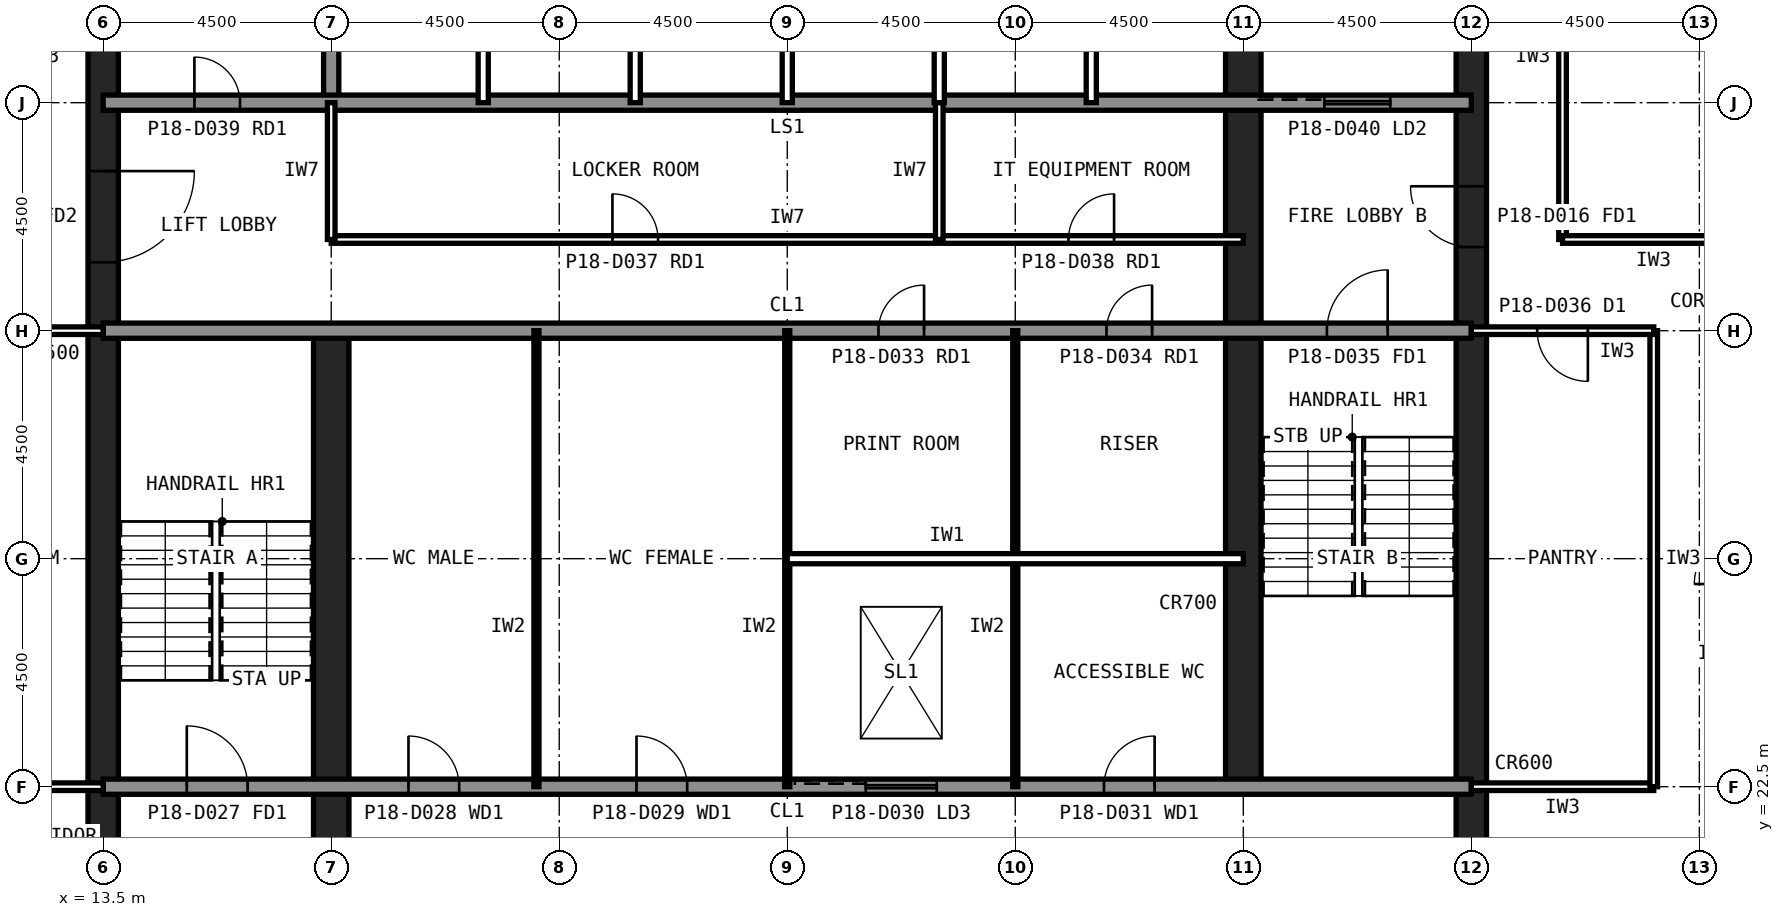
"""IFC4 building model, lengths in metres.
Left out: names, types, materials, properties, quantities, classifications, styles, units other than length and angle.
Written with IfcOpenShell. Run it as: python <this file> out.ifc"""

import sys

from ifc_helpers import new_model, si_unit, direction, frame, frame_2d, origin, place, context, subcontext, project, spatial, rectangle, extrude, element, fill, save


model = new_model("IFC4")
c1 = context("Model", 3, precision=1e-05, world=origin(), true_north=direction((0.0, 1.0)))
c2 = subcontext(c1, "Body", "Model", "MODEL_VIEW")
j1 = project(units=[si_unit("LENGTHUNIT", "METRE"), si_unit("PLANEANGLEUNIT", "RADIAN")], contexts=[c1])
p1 = place(None, origin())
s1 = spatial("IfcSite", under=j1, at=p1, CompositionType="ELEMENT")
p2 = place(p1, origin())
s2 = spatial("IfcBuilding", under=s1, at=p2, CompositionType="ELEMENT")
p3 = place(p2, frame((0.0, 0.0, 79.4)))
s3 = spatial("IfcBuildingStorey", under=s2, at=p3, CompositionType="ELEMENT", Elevation=79.4)
p4 = place(p3, frame((40.5, 13.5, 0.0), z_axis=(0.0, 0.0, 1.0), x_axis=(0.0, 1.0, 0.0)))
e1 = element("IfcWall", 1, at=p4, inside=s3, PredefinedType="SHEAR", context=c2, shape_type="SweptSolid", body=[
    extrude(rectangle(XDim=27.0, YDim=0.6, at=frame_2d((13.5, 0.0))), origin(), (0.0, 0.0, 1.0), 4.2),
])
p5 = place(p4, frame((5.85, 0.0, 0.0)))
e2 = element("IfcOpeningElement", 2, at=p5, cuts=e1, PredefinedType="OPENING", context=c2, shape_type="SweptSolid", body=[
    extrude(rectangle(XDim=1.8, YDim=2.1, at=frame_2d((0.9, 1.05))), frame((0.0, 0.31, 0.0), z_axis=(0.0, -1.0, 0.0), x_axis=(1.0, 0.0, 0.0)), (0.0, 0.0, 1.0), 0.62),
])
p6 = place(p4, frame((19.65, 0.0, 0.0)))
e3 = element("IfcOpeningElement", 3, at=p6, cuts=e1, PredefinedType="OPENING", context=c2, shape_type="SweptSolid", body=[
    extrude(rectangle(XDim=1.2, YDim=2.1, at=frame_2d((0.6, 1.05))), frame((0.0, 0.31, 0.0), z_axis=(0.0, -1.0, 0.0), x_axis=(1.0, 0.0, 0.0)), (0.0, 0.0, 1.0), 0.62),
])
p7 = place(p3, frame((13.5, 40.5, 0.0), z_axis=(0.0, 0.0, 1.0), x_axis=(0.0, -1.0, 0.0)))
e4 = element("IfcWall", 4, at=p7, inside=s3, PredefinedType="SHEAR", context=c2, shape_type="SweptSolid", body=[
    extrude(rectangle(XDim=27.0, YDim=0.6, at=frame_2d((13.5, 0.0))), origin(), (0.0, 0.0, 1.0), 4.2),
])
p8 = place(p7, frame((19.65, 0.0, 0.0)))
e5 = element("IfcOpeningElement", 5, at=p8, cuts=e4, PredefinedType="OPENING", context=c2, shape_type="SweptSolid", body=[
    extrude(rectangle(XDim=1.2, YDim=2.1, at=frame_2d((0.6, 1.05))), frame((0.0, 0.31, 0.0), z_axis=(0.0, -1.0, 0.0), x_axis=(1.0, 0.0, 0.0)), (0.0, 0.0, 1.0), 0.62),
])
p9 = place(p7, frame((5.85, 0.0, 0.0)))
e6 = element("IfcOpeningElement", 6, at=p9, cuts=e4, PredefinedType="OPENING", context=c2, shape_type="SweptSolid", body=[
    extrude(rectangle(XDim=1.8, YDim=2.1, at=frame_2d((0.9, 1.05))), frame((0.0, 0.31, 0.0), z_axis=(0.0, -1.0, 0.0), x_axis=(1.0, 0.0, 0.0)), (0.0, 0.0, 1.0), 0.62),
])
p10 = place(p3, frame((18.0, 13.5, 0.0), z_axis=(0.0, 0.0, 1.0), x_axis=(0.0, 1.0, 0.0)))
e7 = element("IfcWall", 7, at=p10, inside=s3, PredefinedType="SHEAR", context=c2, shape_type="SweptSolid", body=[
    extrude(rectangle(XDim=18.0, YDim=0.7, at=frame_2d((9.0, 0.0))), origin(), (0.0, 0.0, 1.0), 4.2),
])
p11 = place(p3, frame((18.0, 36.0, 0.0), z_axis=(0.0, 0.0, 1.0), x_axis=(0.0, 1.0, 0.0)))
e8 = element("IfcWall", 8, at=p11, inside=s3, PredefinedType="SOLIDWALL", context=c2, shape_type="SweptSolid", body=[
    extrude(rectangle(XDim=4.5, YDim=0.3, at=frame_2d((2.25, 0.0))), origin(), (0.0, 0.0, 1.0), 4.04),
])
p12 = place(p3, frame((36.0, 22.5, 0.0), z_axis=(0.0, 0.0, 1.0), x_axis=(0.0, 1.0, 0.0)))
e9 = element("IfcWall", 9, at=p12, inside=s3, PredefinedType="SHEAR", context=c2, shape_type="SweptSolid", body=[
    extrude(rectangle(XDim=18.0, YDim=0.7, at=frame_2d((9.0, 0.0))), origin(), (0.0, 0.0, 1.0), 4.2),
])
p13 = place(p3, frame((13.5, 36.0, 0.0), z_axis=(0.0, 0.0, 1.0), x_axis=(1.0, 0.0, 0.0)))
e10 = element("IfcWall", 10, at=p13, inside=s3, PredefinedType="SOLIDWALL", context=c2, shape_type="SweptSolid", body=[
    extrude(rectangle(XDim=27.0, YDim=0.3, at=frame_2d((13.5, 0.0))), origin(), (0.0, 0.0, 1.0), 4.04),
])
p14 = place(p13, frame((1.8, 0.0, 0.0)))
e11 = element("IfcOpeningElement", 11, at=p14, cuts=e10, PredefinedType="OPENING", context=c2, shape_type="SweptSolid", body=[
    extrude(rectangle(XDim=0.9, YDim=2.1, at=frame_2d((0.45, 1.05))), frame((0.0, 0.16, 0.0), z_axis=(0.0, -1.0, 0.0), x_axis=(1.0, 0.0, 0.0)), (0.0, 0.0, 1.0), 0.32),
])
p15 = place(p13, frame((24.1, 0.0, 0.0)))
e12 = element("IfcOpeningElement", 12, at=p15, cuts=e10, PredefinedType="OPENING", context=c2, shape_type="SweptSolid", body=[
    extrude(rectangle(XDim=1.3, YDim=2.2, at=frame_2d((0.65, 1.1))), frame((0.0, 0.16, 0.0), z_axis=(0.0, -1.0, 0.0), x_axis=(1.0, 0.0, 0.0)), (0.0, 0.0, 1.0), 0.32),
])
p16 = place(p3, frame((13.5, 22.5, 0.0), z_axis=(0.0, 0.0, 1.0), x_axis=(1.0, 0.0, 0.0)))
e13 = element("IfcWall", 13, at=p16, inside=s3, PredefinedType="SOLIDWALL", context=c2, shape_type="SweptSolid", body=[
    extrude(rectangle(XDim=27.0, YDim=0.3, at=frame_2d((13.5, 0.0))), origin(), (0.0, 0.0, 1.0), 4.04),
])
p17 = place(p16, frame((1.65, 0.0, 0.0)))
e14 = element("IfcOpeningElement", 14, at=p17, cuts=e13, PredefinedType="OPENING", context=c2, shape_type="SweptSolid", body=[
    extrude(rectangle(XDim=1.2, YDim=2.1, at=frame_2d((0.6, 1.05))), frame((0.0, 0.16, 0.0), z_axis=(0.0, -1.0, 0.0), x_axis=(1.0, 0.0, 0.0)), (0.0, 0.0, 1.0), 0.32),
])
p18 = place(p16, frame((6.025, 0.0, 0.0)))
e15 = element("IfcOpeningElement", 15, at=p18, cuts=e13, PredefinedType="OPENING", context=c2, shape_type="SweptSolid", body=[
    extrude(rectangle(XDim=1.0, YDim=2.1, at=frame_2d((0.5, 1.05))), frame((0.0, 0.16, 0.0), z_axis=(0.0, -1.0, 0.0), x_axis=(1.0, 0.0, 0.0)), (0.0, 0.0, 1.0), 0.32),
])
p19 = place(p16, frame((10.525, 0.0, 0.0)))
e16 = element("IfcOpeningElement", 16, at=p19, cuts=e13, PredefinedType="OPENING", context=c2, shape_type="SweptSolid", body=[
    extrude(rectangle(XDim=1.0, YDim=2.1, at=frame_2d((0.5, 1.05))), frame((0.0, 0.16, 0.0), z_axis=(0.0, -1.0, 0.0), x_axis=(1.0, 0.0, 0.0)), (0.0, 0.0, 1.0), 0.32),
])
p20 = place(p16, frame((19.75, 0.0, 0.0)))
e17 = element("IfcOpeningElement", 17, at=p20, cuts=e13, PredefinedType="OPENING", context=c2, shape_type="SweptSolid", body=[
    extrude(rectangle(XDim=1.0, YDim=2.1, at=frame_2d((0.5, 1.05))), frame((0.0, 0.16, 0.0), z_axis=(0.0, -1.0, 0.0), x_axis=(1.0, 0.0, 0.0)), (0.0, 0.0, 1.0), 0.32),
])
p21 = place(p16, frame((15.05, 0.0, 0.0)))
e18 = element("IfcOpeningElement", 18, at=p21, cuts=e13, PredefinedType="OPENING", context=c2, shape_type="SweptSolid", body=[
    extrude(rectangle(XDim=1.4, YDim=2.4, at=frame_2d((0.7, 1.2))), frame((0.0, 0.16, 0.0), z_axis=(0.0, -1.0, 0.0), x_axis=(1.0, 0.0, 0.0)), (0.0, 0.0, 1.0), 0.32),
])
p22 = place(p3, frame((13.5, 31.5, 0.0), z_axis=(0.0, 0.0, 1.0), x_axis=(1.0, 0.0, 0.0)))
e19 = element("IfcWall", 19, at=p22, inside=s3, PredefinedType="SOLIDWALL", context=c2, shape_type="SweptSolid", body=[
    extrude(rectangle(XDim=27.0, YDim=0.3, at=frame_2d((13.5, 0.0))), origin(), (0.0, 0.0, 1.0), 4.04),
])
p23 = place(p22, frame((24.15, 0.0, 0.0)))
e20 = element("IfcOpeningElement", 20, at=p23, cuts=e19, PredefinedType="OPENING", context=c2, shape_type="SweptSolid", body=[
    extrude(rectangle(XDim=1.2, YDim=2.1, at=frame_2d((0.6, 1.05))), frame((0.0, 0.16, 0.0), z_axis=(0.0, -1.0, 0.0), x_axis=(1.0, 0.0, 0.0)), (0.0, 0.0, 1.0), 0.32),
])
p24 = place(p22, frame((15.3, 0.0, 0.0)))
e21 = element("IfcOpeningElement", 21, at=p24, cuts=e19, PredefinedType="OPENING", context=c2, shape_type="SweptSolid", body=[
    extrude(rectangle(XDim=0.9, YDim=2.1, at=frame_2d((0.45, 1.05))), frame((0.0, 0.16, 0.0), z_axis=(0.0, -1.0, 0.0), x_axis=(1.0, 0.0, 0.0)), (0.0, 0.0, 1.0), 0.32),
])
p25 = place(p22, frame((19.8, 0.0, 0.0)))
e22 = element("IfcOpeningElement", 22, at=p25, cuts=e19, PredefinedType="OPENING", context=c2, shape_type="SweptSolid", body=[
    extrude(rectangle(XDim=0.9, YDim=2.1, at=frame_2d((0.45, 1.05))), frame((0.0, 0.16, 0.0), z_axis=(0.0, -1.0, 0.0), x_axis=(1.0, 0.0, 0.0)), (0.0, 0.0, 1.0), 0.32),
])
for number, where, z_axis, x_axis in (
    (23, (21.0, 36.0, 0.0), (0.0, 0.0, 1.0), (0.0, 1.0, 0.0)),
    (24, (24.0, 36.0, 0.0), (0.0, 0.0, 1.0), (0.0, 1.0, 0.0)),
    (25, (27.0, 36.0, 0.0), (0.0, 0.0, 1.0), (0.0, 1.0, 0.0)),
    (26, (30.0, 36.0, 0.0), (0.0, 0.0, 1.0), (0.0, 1.0, 0.0)),
    (27, (33.0, 36.0, 0.0), (0.0, 0.0, 1.0), (0.0, 1.0, 0.0)),
):
    element("IfcWall", number, at=place(p3, frame(where, z_axis=z_axis, x_axis=x_axis)), inside=s3, PredefinedType="PARTITIONING", context=c2, shape_type="SweptSolid", body=[
        extrude(rectangle(XDim=4.5, YDim=0.2, at=frame_2d((2.25, 0.0))), origin(), (0.0, 0.0, 1.0), 4.04),
    ])
for number, where, z_axis, x_axis in (
    (28, (22.05, 22.5, 0.0), (0.0, 0.0, 1.0), (0.0, 1.0, 0.0)),
    (29, (27.0, 22.5, 0.0), (0.0, 0.0, 1.0), (0.0, 1.0, 0.0)),
    (30, (31.5, 22.5, 0.0), (0.0, 0.0, 1.0), (0.0, 1.0, 0.0)),
):
    element("IfcWall", number, at=place(p3, frame(where, z_axis=z_axis, x_axis=x_axis)), inside=s3, PredefinedType="PLUMBINGWALL", context=c2, shape_type="SweptSolid", body=[
        extrude(rectangle(XDim=9.0, YDim=0.1, at=frame_2d((4.5, 0.0))), origin(), (0.0, 0.0, 1.0), 4.04),
    ])
p26 = place(p3, frame((27.0, 27.0, 0.0), z_axis=(0.0, 0.0, 1.0), x_axis=(1.0, 0.0, 0.0)))
e31 = element("IfcWall", 31, at=p26, inside=s3, PredefinedType="PARTITIONING", context=c2, shape_type="SweptSolid", body=[
    extrude(rectangle(XDim=9.0, YDim=0.2, at=frame_2d((4.5, 0.0))), origin(), (0.0, 0.0, 1.0), 4.04),
])
p27 = place(p3, frame((18.0, 33.3, 0.0), z_axis=(0.0, 0.0, 1.0), x_axis=(1.0, 0.0, 0.0)))
e32 = element("IfcWall", 32, at=p27, inside=s3, PredefinedType="PARTITIONING", context=c2, shape_type="SweptSolid", body=[
    extrude(rectangle(XDim=18.0, YDim=0.15, at=frame_2d((9.0, 0.0))), origin(), (0.0, 0.0, 1.0), 4.04),
])
p28 = place(p27, frame((5.55, 0.0, 0.0)))
e33 = element("IfcOpeningElement", 33, at=p28, cuts=e32, PredefinedType="OPENING", context=c2, shape_type="SweptSolid", body=[
    extrude(rectangle(XDim=0.9, YDim=2.1, at=frame_2d((0.45, 1.05))), frame((0.0, 0.085, 0.0), z_axis=(0.0, -1.0, 0.0), x_axis=(1.0, 0.0, 0.0)), (0.0, 0.0, 1.0), 0.17),
])
p29 = place(p27, frame((14.55, 0.0, 0.0)))
e34 = element("IfcOpeningElement", 34, at=p29, cuts=e32, PredefinedType="OPENING", context=c2, shape_type="SweptSolid", body=[
    extrude(rectangle(XDim=0.9, YDim=2.1, at=frame_2d((0.45, 1.05))), frame((0.0, 0.085, 0.0), z_axis=(0.0, -1.0, 0.0), x_axis=(1.0, 0.0, 0.0)), (0.0, 0.0, 1.0), 0.17),
])
for number, where, z_axis, x_axis in (
    (35, (18.0, 33.3, 0.0), (0.0, 0.0, 1.0), (0.0, 1.0, 0.0)),
    (36, (30.0, 33.3, 0.0), (0.0, 0.0, 1.0), (0.0, 1.0, 0.0)),
):
    element("IfcWall", number, at=place(p3, frame(where, z_axis=z_axis, x_axis=x_axis)), inside=s3, PredefinedType="PARTITIONING", context=c2, shape_type="SweptSolid", body=[
        extrude(rectangle(XDim=2.7, YDim=0.15, at=frame_2d((1.35, 0.0))), origin(), (0.0, 0.0, 1.0), 4.04),
    ])
p30 = place(p3, frame((42.3, 33.3, 0.0), z_axis=(0.0, 0.0, 1.0), x_axis=(0.0, 1.0, 0.0)))
e37 = element("IfcWall", 37, at=p30, inside=s3, PredefinedType="PARTITIONING", context=c2, shape_type="SweptSolid", body=[
    extrude(rectangle(XDim=7.2, YDim=0.15, at=frame_2d((3.6, 0.0))), origin(), (0.0, 0.0, 1.0), 4.04),
])
p31 = place(p3, frame((45.9, 33.3, 0.0), z_axis=(0.0, 0.0, 1.0), x_axis=(-1.0, 0.0, 0.0)))
e38 = element("IfcWall", 38, at=p31, inside=s3, PredefinedType="PARTITIONING", context=c2, shape_type="SweptSolid", body=[
    extrude(rectangle(XDim=3.6, YDim=0.15, at=frame_2d((1.8, 0.0))), origin(), (0.0, 0.0, 1.0), 4.04),
])
p32 = place(p3, frame((9.0, 22.5, 0.0), z_axis=(0.0, 0.0, 1.0), x_axis=(1.0, 0.0, 0.0)))
e39 = element("IfcWall", 39, at=p32, inside=s3, PredefinedType="PARTITIONING", context=c2, shape_type="SweptSolid", body=[
    extrude(rectangle(XDim=4.5, YDim=0.15, at=frame_2d((2.25, 0.0))), origin(), (0.0, 0.0, 1.0), 3.189),
])
p33 = place(p3, frame((13.5, 31.5, 0.0), z_axis=(0.0, 0.0, 1.0), x_axis=(-1.0, 0.0, 0.0)))
e40 = element("IfcWall", 40, at=p33, inside=s3, PredefinedType="PARTITIONING", context=c2, shape_type="SweptSolid", body=[
    extrude(rectangle(XDim=4.5, YDim=0.15, at=frame_2d((2.25, 0.0))), origin(), (0.0, 0.0, 1.0), 3.189),
])
p34 = place(p33, frame((1.75, 0.0, 0.0)))
e41 = element("IfcOpeningElement", 41, at=p34, cuts=e40, PredefinedType="OPENING", context=c2, shape_type="SweptSolid", body=[
    extrude(rectangle(XDim=1.0, YDim=2.1, at=frame_2d((0.5, 1.05))), frame((0.0, 0.085, 0.0), z_axis=(0.0, -1.0, 0.0), x_axis=(1.0, 0.0, 0.0)), (0.0, 0.0, 1.0), 0.17),
])
p35 = place(p3, frame((40.5, 22.5, 0.0), z_axis=(0.0, 0.0, 1.0), x_axis=(1.0, 0.0, 0.0)))
e42 = element("IfcWall", 42, at=p35, inside=s3, PredefinedType="PARTITIONING", context=c2, shape_type="SweptSolid", body=[
    extrude(rectangle(XDim=3.6, YDim=0.15, at=frame_2d((1.8, 0.0))), origin(), (0.0, 0.0, 1.0), 3.189),
])
p36 = place(p3, frame((44.1, 22.5, 0.0), z_axis=(0.0, 0.0, 1.0), x_axis=(0.0, 1.0, 0.0)))
e43 = element("IfcWall", 43, at=p36, inside=s3, PredefinedType="PARTITIONING", context=c2, shape_type="SweptSolid", body=[
    extrude(rectangle(XDim=9.0, YDim=0.15, at=frame_2d((4.5, 0.0))), origin(), (0.0, 0.0, 1.0), 4.04),
])
p37 = place(p3, frame((44.1, 31.5, 0.0), z_axis=(0.0, 0.0, 1.0), x_axis=(-1.0, 0.0, 0.0)))
e44 = element("IfcWall", 44, at=p37, inside=s3, PredefinedType="PARTITIONING", context=c2, shape_type="SweptSolid", body=[
    extrude(rectangle(XDim=3.6, YDim=0.15, at=frame_2d((1.8, 0.0))), origin(), (0.0, 0.0, 1.0), 3.189),
])
p38 = place(p37, frame((1.3, 0.0, 0.0)))
e45 = element("IfcOpeningElement", 45, at=p38, cuts=e44, PredefinedType="OPENING", context=c2, shape_type="SweptSolid", body=[
    extrude(rectangle(XDim=1.0, YDim=2.1, at=frame_2d((0.5, 1.05))), frame((0.0, 0.085, 0.0), z_axis=(0.0, -1.0, 0.0), x_axis=(1.0, 0.0, 0.0)), (0.0, 0.0, 1.0), 0.17),
])
p39 = place(p9, origin())
e46 = element("IfcDoor", 46, at=p39, inside=s3, OperationType="SINGLE_SWING_LEFT", PredefinedType="DOOR", context=c2, shape_type="SweptSolid", body=[
    extrude(rectangle(XDim=1.8, YDim=2.1, at=frame_2d((0.9, 1.05))), frame((0.0, 0.025, 0.0), z_axis=(0.0, -1.0, 0.0), x_axis=(1.0, 0.0, 0.0)), (0.0, 0.0, 1.0), 0.05),
])
fill(e6, e46)
p40 = place(p6, origin())
e47 = element("IfcDoor", 47, at=p40, inside=s3, OperationType="SINGLE_SWING_RIGHT", PredefinedType="DOOR", context=c2, shape_type="SweptSolid", body=[
    extrude(rectangle(XDim=1.2, YDim=2.1, at=frame_2d((0.6, 1.05))), frame((0.0, 0.025, 0.0), z_axis=(0.0, -1.0, 0.0), x_axis=(1.0, 0.0, 0.0)), (0.0, 0.0, 1.0), 0.05),
])
fill(e3, e47)
p41 = place(p17, origin())
e48 = element("IfcDoor", 48, at=p41, inside=s3, OperationType="SINGLE_SWING_LEFT", PredefinedType="DOOR", context=c2, shape_type="SweptSolid", body=[
    extrude(rectangle(XDim=1.2, YDim=2.1, at=frame_2d((0.6, 1.05))), frame((0.0, 0.025, 0.0), z_axis=(0.0, -1.0, 0.0), x_axis=(1.0, 0.0, 0.0)), (0.0, 0.0, 1.0), 0.05),
])
fill(e14, e48)
p42 = place(p23, origin())
e49 = element("IfcDoor", 49, at=p42, inside=s3, OperationType="SINGLE_SWING_RIGHT", PredefinedType="DOOR", context=c2, shape_type="SweptSolid", body=[
    extrude(rectangle(XDim=1.2, YDim=2.1, at=frame_2d((0.6, 1.05))), frame((0.0, 0.025, 0.0), z_axis=(0.0, -1.0, 0.0), x_axis=(1.0, 0.0, 0.0)), (0.0, 0.0, 1.0), 0.05),
])
fill(e20, e49)
p43 = place(p18, origin())
e50 = element("IfcDoor", 50, at=p43, inside=s3, OperationType="SINGLE_SWING_LEFT", PredefinedType="DOOR", context=c2, shape_type="SweptSolid", body=[
    extrude(rectangle(XDim=1.0, YDim=2.1, at=frame_2d((0.5, 1.05))), frame((0.0, 0.025, 0.0), z_axis=(0.0, -1.0, 0.0), x_axis=(1.0, 0.0, 0.0)), (0.0, 0.0, 1.0), 0.05),
])
fill(e15, e50)
p44 = place(p19, origin())
e51 = element("IfcDoor", 51, at=p44, inside=s3, OperationType="SINGLE_SWING_LEFT", PredefinedType="DOOR", context=c2, shape_type="SweptSolid", body=[
    extrude(rectangle(XDim=1.0, YDim=2.1, at=frame_2d((0.5, 1.05))), frame((0.0, 0.025, 0.0), z_axis=(0.0, -1.0, 0.0), x_axis=(1.0, 0.0, 0.0)), (0.0, 0.0, 1.0), 0.05),
])
fill(e16, e51)
p45 = place(p20, origin())
e52 = element("IfcDoor", 52, at=p45, inside=s3, OperationType="SINGLE_SWING_RIGHT", PredefinedType="DOOR", context=c2, shape_type="SweptSolid", body=[
    extrude(rectangle(XDim=1.0, YDim=2.1, at=frame_2d((0.5, 1.05))), frame((0.0, 0.025, 0.0), z_axis=(0.0, -1.0, 0.0), x_axis=(1.0, 0.0, 0.0)), (0.0, 0.0, 1.0), 0.05),
])
fill(e17, e52)
p46 = place(p24, origin())
e53 = element("IfcDoor", 53, at=p46, inside=s3, OperationType="SINGLE_SWING_RIGHT", PredefinedType="DOOR", context=c2, shape_type="SweptSolid", body=[
    extrude(rectangle(XDim=0.9, YDim=2.1, at=frame_2d((0.45, 1.05))), frame((0.0, 0.025, 0.0), z_axis=(0.0, -1.0, 0.0), x_axis=(1.0, 0.0, 0.0)), (0.0, 0.0, 1.0), 0.05),
])
fill(e21, e53)
p47 = place(p25, origin())
e54 = element("IfcDoor", 54, at=p47, inside=s3, OperationType="SINGLE_SWING_RIGHT", PredefinedType="DOOR", context=c2, shape_type="SweptSolid", body=[
    extrude(rectangle(XDim=0.9, YDim=2.1, at=frame_2d((0.45, 1.05))), frame((0.0, 0.025, 0.0), z_axis=(0.0, -1.0, 0.0), x_axis=(1.0, 0.0, 0.0)), (0.0, 0.0, 1.0), 0.05),
])
fill(e22, e54)
p48 = place(p14, origin())
e55 = element("IfcDoor", 55, at=p48, inside=s3, OperationType="SINGLE_SWING_LEFT", PredefinedType="DOOR", context=c2, shape_type="SweptSolid", body=[
    extrude(rectangle(XDim=0.9, YDim=2.1, at=frame_2d((0.45, 1.05))), frame((0.0, 0.025, 0.0), z_axis=(0.0, -1.0, 0.0), x_axis=(1.0, 0.0, 0.0)), (0.0, 0.0, 1.0), 0.05),
])
fill(e11, e55)
p49 = place(p28, origin())
e56 = element("IfcDoor", 56, at=p49, inside=s3, OperationType="SINGLE_SWING_LEFT", PredefinedType="DOOR", context=c2, shape_type="SweptSolid", body=[
    extrude(rectangle(XDim=0.9, YDim=2.1, at=frame_2d((0.45, 1.05))), frame((0.0, 0.025, 0.0), z_axis=(0.0, -1.0, 0.0), x_axis=(1.0, 0.0, 0.0)), (0.0, 0.0, 1.0), 0.05),
])
fill(e33, e56)
p50 = place(p29, origin())
e57 = element("IfcDoor", 57, at=p50, inside=s3, OperationType="SINGLE_SWING_RIGHT", PredefinedType="DOOR", context=c2, shape_type="SweptSolid", body=[
    extrude(rectangle(XDim=0.9, YDim=2.1, at=frame_2d((0.45, 1.05))), frame((0.0, 0.025, 0.0), z_axis=(0.0, -1.0, 0.0), x_axis=(1.0, 0.0, 0.0)), (0.0, 0.0, 1.0), 0.05),
])
fill(e34, e57)
p51 = place(p15, origin())
e58 = element("IfcDoor", 58, at=p51, inside=s3, OperationType="SLIDING_TO_LEFT", PredefinedType="DOOR", context=c2, shape_type="SweptSolid", body=[
    extrude(rectangle(XDim=1.3, YDim=2.2, at=frame_2d((0.65, 1.1))), frame((0.0, 0.025, 0.0), z_axis=(0.0, -1.0, 0.0), x_axis=(1.0, 0.0, 0.0)), (0.0, 0.0, 1.0), 0.05),
])
fill(e12, e58)
p52 = place(p21, origin())
e59 = element("IfcDoor", 59, at=p52, inside=s3, OperationType="SLIDING_TO_LEFT", PredefinedType="DOOR", context=c2, shape_type="SweptSolid", body=[
    extrude(rectangle(XDim=1.4, YDim=2.4, at=frame_2d((0.7, 1.2))), frame((0.0, 0.025, 0.0), z_axis=(0.0, -1.0, 0.0), x_axis=(1.0, 0.0, 0.0)), (0.0, 0.0, 1.0), 0.05),
])
fill(e18, e59)
p53 = place(p38, origin())
e60 = element("IfcDoor", 60, at=p53, inside=s3, OperationType="SINGLE_SWING_LEFT", PredefinedType="DOOR", context=c2, shape_type="SweptSolid", body=[
    extrude(rectangle(XDim=1.0, YDim=2.1, at=frame_2d((0.5, 1.05))), frame((0.0, 0.025, 0.0), z_axis=(0.0, -1.0, 0.0), x_axis=(1.0, 0.0, 0.0)), (0.0, 0.0, 1.0), 0.05),
])
fill(e45, e60)
save(model, sys.argv[1])
